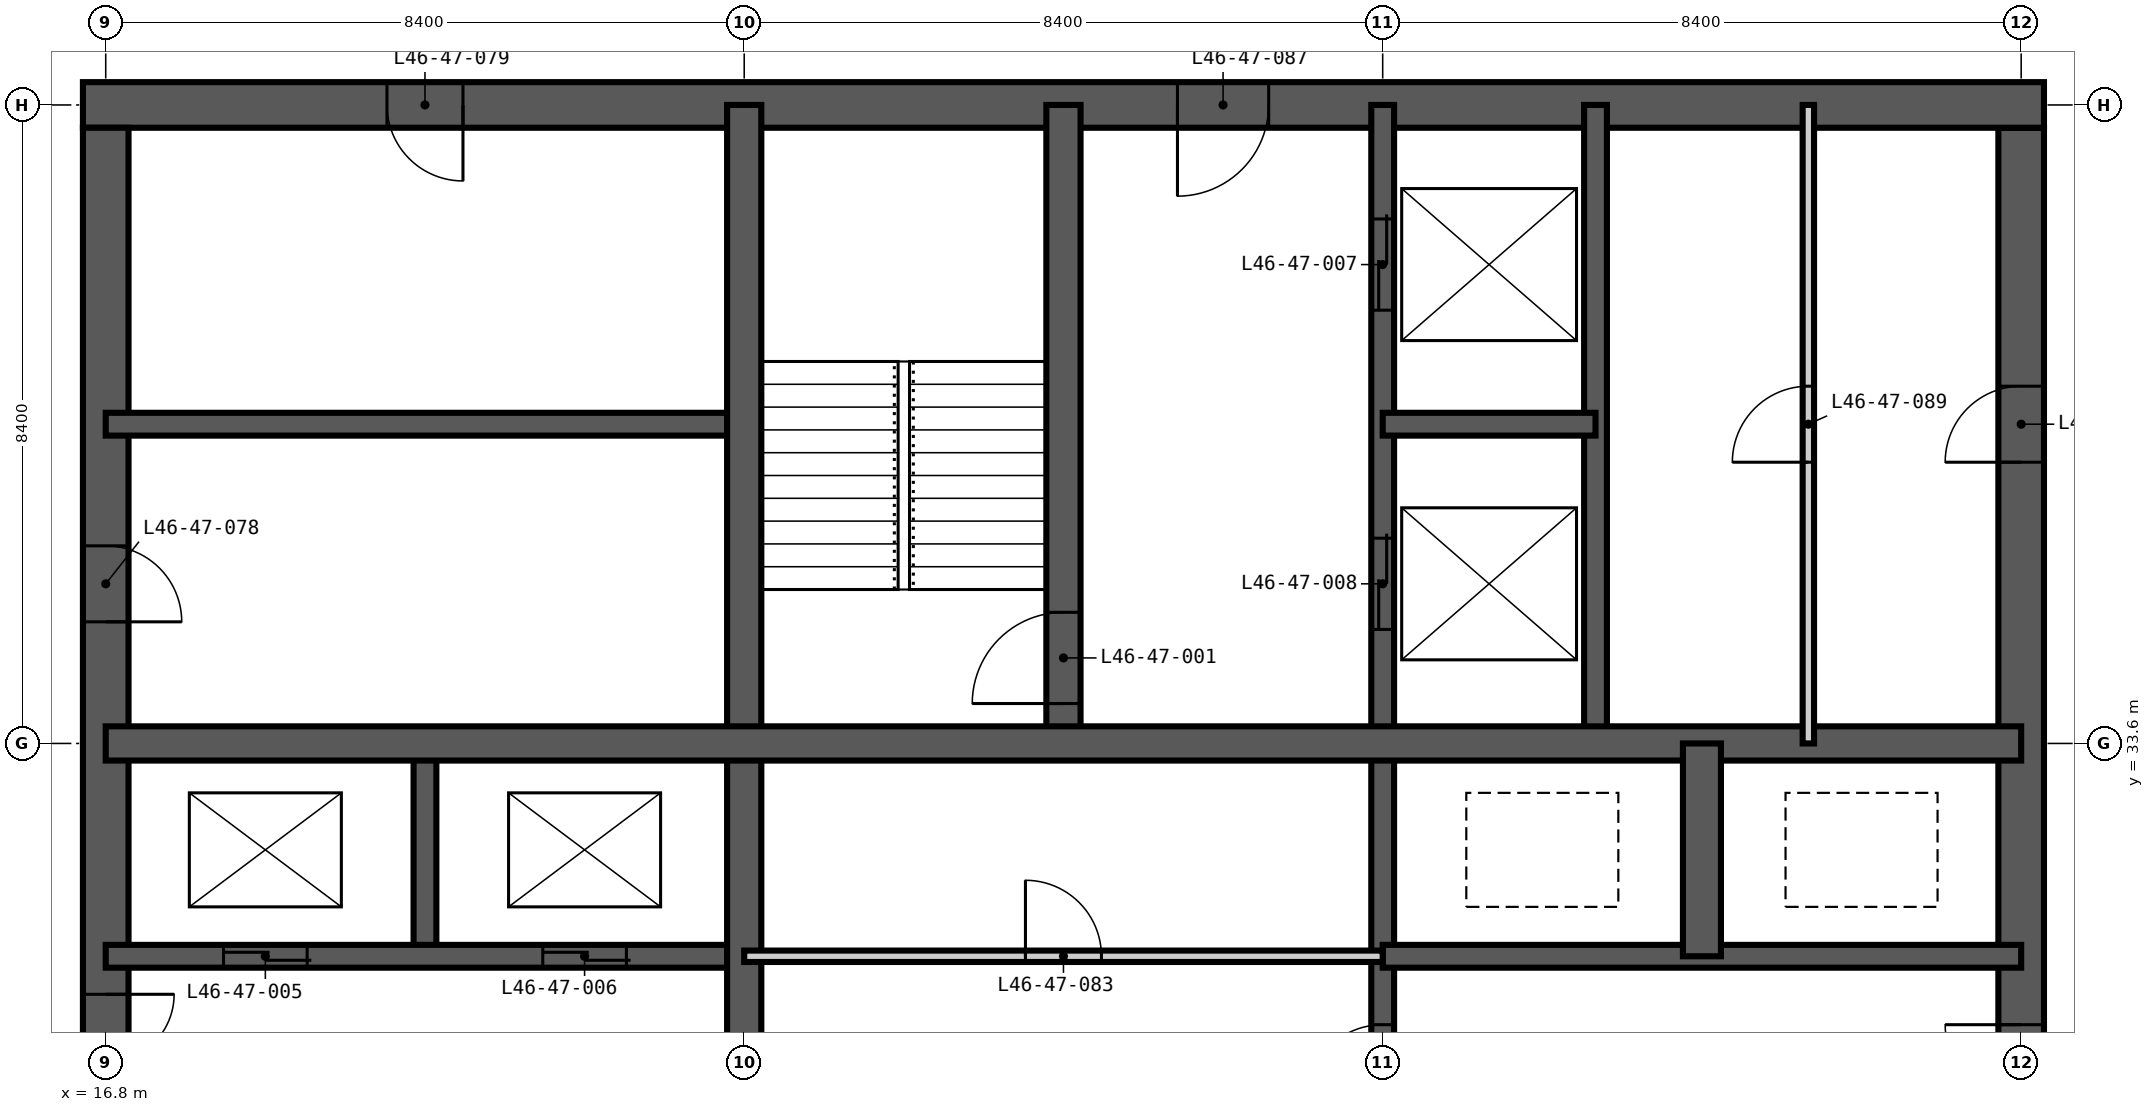
"""IFC4 building model, lengths in metres.
Left out: names, types, materials, properties, quantities, classifications, styles, units other than length and angle.
Written with IfcOpenShell. Run it as: python <this file> out.ifc"""

import sys

from ifc_helpers import new_model, si_unit, direction, frame, frame_2d, origin, place, context, subcontext, project, spatial, rectangle, extrude, element, fill, save


model = new_model("IFC4")
c1 = context("Model", 3, precision=1e-05, world=origin(), true_north=direction((0.0, 1.0)))
c2 = subcontext(c1, "Body", "Model", "MODEL_VIEW")
j1 = project(units=[si_unit("LENGTHUNIT", "METRE"), si_unit("PLANEANGLEUNIT", "RADIAN")], contexts=[c1])
p1 = place(None, origin())
s1 = spatial("IfcSite", under=j1, at=p1, CompositionType="ELEMENT")
p2 = place(p1, origin())
s2 = spatial("IfcBuilding", under=s1, at=p2, CompositionType="ELEMENT")
p3 = place(p2, frame((0.0, 0.0, 180.6)))
s3 = spatial("IfcBuildingStorey", under=s2, at=p3, CompositionType="ELEMENT", Elevation=180.6)
p4 = place(p3, frame((42.0, 17.1, -0.35), z_axis=(0.0, 0.0, 1.0), x_axis=(0.0, 1.0, 0.0)))
e1 = element("IfcWall", 1, at=p4, inside=s3, PredefinedType="SHEAR", context=c2, shape_type="SweptSolid", body=[
    extrude(rectangle(XDim=24.6, YDim=0.6, at=frame_2d((12.3, 0.0))), origin(), (0.0, 0.0, 1.0), 3.6),
])
p5 = place(p4, frame((0.5, 0.0, 0.35)))
e2 = element("IfcOpeningElement", 2, at=p5, cuts=e1, PredefinedType="OPENING", context=c2, shape_type="SweptSolid", body=[
    extrude(rectangle(XDim=1.2, YDim=2.2, at=frame_2d((0.6, 1.1))), frame((0.0, 0.31, 0.0), z_axis=(0.0, -1.0, 0.0), x_axis=(1.0, 0.0, 0.0)), (0.0, 0.0, 1.0), 0.62),
])
p6 = place(p4, frame((11.8, 0.0, 0.35)))
e3 = element("IfcOpeningElement", 3, at=p6, cuts=e1, PredefinedType="OPENING", context=c2, shape_type="SweptSolid", body=[
    extrude(rectangle(XDim=1.0, YDim=2.1, at=frame_2d((0.5, 1.05))), frame((0.0, 0.31, 0.0), z_axis=(0.0, -1.0, 0.0), x_axis=(1.0, 0.0, 0.0)), (0.0, 0.0, 1.0), 0.62),
])
p7 = place(p4, frame((20.2, 0.0, 0.35)))
e4 = element("IfcOpeningElement", 4, at=p7, cuts=e1, PredefinedType="OPENING", context=c2, shape_type="SweptSolid", body=[
    extrude(rectangle(XDim=1.0, YDim=2.1, at=frame_2d((0.5, 1.05))), frame((0.0, 0.31, 0.0), z_axis=(0.0, -1.0, 0.0), x_axis=(1.0, 0.0, 0.0)), (0.0, 0.0, 1.0), 0.62),
])
p8 = place(p3, frame((42.3, 42.0, -0.35), z_axis=(0.0, 0.0, 1.0), x_axis=(-1.0, 0.0, 0.0)))
e5 = element("IfcWall", 5, at=p8, inside=s3, PredefinedType="SHEAR", context=c2, shape_type="SweptSolid", body=[
    extrude(rectangle(XDim=25.8, YDim=0.6, at=frame_2d((12.9, 0.0))), origin(), (0.0, 0.0, 1.0), 3.6),
])
p9 = place(p8, frame((20.8, 0.0, 0.35)))
e6 = element("IfcOpeningElement", 6, at=p9, cuts=e5, PredefinedType="OPENING", context=c2, shape_type="SweptSolid", body=[
    extrude(rectangle(XDim=1.0, YDim=2.1, at=frame_2d((0.5, 1.05))), frame((0.0, 0.31, 0.0), z_axis=(0.0, -1.0, 0.0), x_axis=(1.0, 0.0, 0.0)), (0.0, 0.0, 1.0), 0.62),
])
p10 = place(p8, frame((10.2, 0.0, 0.35)))
e7 = element("IfcOpeningElement", 7, at=p10, cuts=e5, PredefinedType="OPENING", context=c2, shape_type="SweptSolid", body=[
    extrude(rectangle(XDim=1.2, YDim=2.2, at=frame_2d((0.6, 1.1))), frame((0.0, 0.31, 0.0), z_axis=(0.0, -1.0, 0.0), x_axis=(1.0, 0.0, 0.0)), (0.0, 0.0, 1.0), 0.62),
])
p11 = place(p3, frame((16.8, 41.7, -0.35), z_axis=(0.0, 0.0, 1.0), x_axis=(0.0, -1.0, 0.0)))
e8 = element("IfcWall", 8, at=p11, inside=s3, PredefinedType="SHEAR", context=c2, shape_type="SweptSolid", body=[
    extrude(rectangle(XDim=24.6, YDim=0.6, at=frame_2d((12.3, 0.0))), origin(), (0.0, 0.0, 1.0), 3.6),
])
p12 = place(p11, frame((11.4, 0.0, 0.35)))
e9 = element("IfcOpeningElement", 9, at=p12, cuts=e8, PredefinedType="OPENING", context=c2, shape_type="SweptSolid", body=[
    extrude(rectangle(XDim=1.8, YDim=2.2, at=frame_2d((0.9, 1.1))), frame((0.0, 0.31, 0.0), z_axis=(0.0, -1.0, 0.0), x_axis=(1.0, 0.0, 0.0)), (0.0, 0.0, 1.0), 0.62),
])
p13 = place(p11, frame((20.2, 0.0, 0.35)))
e10 = element("IfcOpeningElement", 10, at=p13, cuts=e8, PredefinedType="OPENING", context=c2, shape_type="SweptSolid", body=[
    extrude(rectangle(XDim=1.0, YDim=2.1, at=frame_2d((0.5, 1.05))), frame((0.0, 0.31, 0.0), z_axis=(0.0, -1.0, 0.0), x_axis=(1.0, 0.0, 0.0)), (0.0, 0.0, 1.0), 0.62),
])
p14 = place(p11, frame((5.5, 0.0, 0.35)))
e11 = element("IfcOpeningElement", 11, at=p14, cuts=e8, PredefinedType="OPENING", context=c2, shape_type="SweptSolid", body=[
    extrude(rectangle(XDim=1.0, YDim=2.1, at=frame_2d((0.5, 1.05))), frame((0.0, 0.31, 0.0), z_axis=(0.0, -1.0, 0.0), x_axis=(1.0, 0.0, 0.0)), (0.0, 0.0, 1.0), 0.62),
])
p15 = place(p3, frame((21.0, 30.8, -0.35), z_axis=(0.0, 0.0, 1.0), x_axis=(0.0, 1.0, 0.0)))
e12 = element("IfcWall", 12, at=p15, inside=s3, PredefinedType="SHEAR", context=c2, shape_type="SweptSolid", body=[
    extrude(rectangle(XDim=2.8, YDim=0.3, at=frame_2d((1.4, 0.0))), origin(), (0.0, 0.0, 1.0), 3.6),
])
p16 = place(p3, frame((33.6, 16.8, -0.35), z_axis=(0.0, 0.0, 1.0), x_axis=(0.0, 1.0, 0.0)))
e13 = element("IfcWall", 13, at=p16, inside=s3, PredefinedType="SHEAR", context=c2, shape_type="SweptSolid", body=[
    extrude(rectangle(XDim=25.2, YDim=0.3, at=frame_2d((12.6, 0.0))), origin(), (0.0, 0.0, 1.0), 3.6),
])
p17 = place(p16, frame((22.5, 0.0, 0.35)))
e14 = element("IfcOpeningElement", 14, at=p17, cuts=e13, PredefinedType="OPENING", context=c2, shape_type="SweptSolid", body=[
    extrude(rectangle(XDim=1.2, YDim=2.2, at=frame_2d((0.6, 1.1))), frame((0.0, 0.16, 0.0), z_axis=(0.0, -1.0, 0.0), x_axis=(1.0, 0.0, 0.0)), (0.0, 0.0, 1.0), 0.32),
])
p18 = place(p16, frame((18.3, 0.0, 0.35)))
e15 = element("IfcOpeningElement", 15, at=p18, cuts=e13, PredefinedType="OPENING", context=c2, shape_type="SweptSolid", body=[
    extrude(rectangle(XDim=1.2, YDim=2.2, at=frame_2d((0.6, 1.1))), frame((0.0, 0.16, 0.0), z_axis=(0.0, -1.0, 0.0), x_axis=(1.0, 0.0, 0.0)), (0.0, 0.0, 1.0), 0.32),
])
p19 = place(p16, frame((12.1, 0.0, 0.35)))
e16 = element("IfcOpeningElement", 16, at=p19, cuts=e13, PredefinedType="OPENING", context=c2, shape_type="SweptSolid", body=[
    extrude(rectangle(XDim=1.0, YDim=2.1, at=frame_2d((0.5, 1.05))), frame((0.0, 0.16, 0.0), z_axis=(0.0, -1.0, 0.0), x_axis=(1.0, 0.0, 0.0)), (0.0, 0.0, 1.0), 0.32),
])
p20 = place(p3, frame((36.4, 33.6, -0.35), z_axis=(0.0, 0.0, 1.0), x_axis=(0.0, 1.0, 0.0)))
e17 = element("IfcWall", 17, at=p20, inside=s3, PredefinedType="SHEAR", context=c2, shape_type="SweptSolid", body=[
    extrude(rectangle(XDim=8.4, YDim=0.3, at=frame_2d((4.2, 0.0))), origin(), (0.0, 0.0, 1.0), 3.6),
])
p21 = place(p3, frame((16.8, 30.8, -0.35), z_axis=(0.0, 0.0, 1.0), x_axis=(1.0, 0.0, 0.0)))
e18 = element("IfcWall", 18, at=p21, inside=s3, PredefinedType="SHEAR", context=c2, shape_type="SweptSolid", body=[
    extrude(rectangle(XDim=8.4, YDim=0.3, at=frame_2d((4.2, 0.0))), origin(), (0.0, 0.0, 1.0), 3.6),
])
p22 = place(p21, frame((1.55, 0.0, 0.35)))
e19 = element("IfcOpeningElement", 19, at=p22, cuts=e18, PredefinedType="OPENING", context=c2, shape_type="SweptSolid", body=[
    extrude(rectangle(XDim=1.1, YDim=2.2, at=frame_2d((0.55, 1.1))), frame((0.0, 0.16, 0.0), z_axis=(0.0, -1.0, 0.0), x_axis=(1.0, 0.0, 0.0)), (0.0, 0.0, 1.0), 0.32),
])
p23 = place(p21, frame((5.75, 0.0, 0.35)))
e20 = element("IfcOpeningElement", 20, at=p23, cuts=e18, PredefinedType="OPENING", context=c2, shape_type="SweptSolid", body=[
    extrude(rectangle(XDim=1.1, YDim=2.2, at=frame_2d((0.55, 1.1))), frame((0.0, 0.16, 0.0), z_axis=(0.0, -1.0, 0.0), x_axis=(1.0, 0.0, 0.0)), (0.0, 0.0, 1.0), 0.32),
])
for number, where, z_axis, x_axis in (
    (21, (33.6, 30.8, -0.35), (0.0, 0.0, 1.0), (1.0, 0.0, 0.0)),
    (22, (16.8, 37.8, -0.35), (0.0, 0.0, 1.0), (1.0, 0.0, 0.0)),
):
    element("IfcWall", number, at=place(p3, frame(where, z_axis=z_axis, x_axis=x_axis)), inside=s3, PredefinedType="SHEAR", context=c2, shape_type="SweptSolid", body=[
        extrude(rectangle(XDim=8.4, YDim=0.3, at=frame_2d((4.2, 0.0))), origin(), (0.0, 0.0, 1.0), 3.6),
    ])
p24 = place(p3, frame((33.6, 37.8, -0.35), z_axis=(0.0, 0.0, 1.0), x_axis=(1.0, 0.0, 0.0)))
e23 = element("IfcWall", 23, at=p24, inside=s3, PredefinedType="SHEAR", context=c2, shape_type="SweptSolid", body=[
    extrude(rectangle(XDim=2.8, YDim=0.3, at=frame_2d((1.4, 0.0))), origin(), (0.0, 0.0, 1.0), 3.6),
])
p25 = place(p3, frame((25.2, 16.8, -0.35), z_axis=(0.0, 0.0, 1.0), x_axis=(0.0, 1.0, 0.0)))
e24 = element("IfcWall", 24, at=p25, inside=s3, PredefinedType="SHEAR", context=c2, shape_type="SweptSolid", body=[
    extrude(rectangle(XDim=25.2, YDim=0.45, at=frame_2d((12.6, 0.0))), origin(), (0.0, 0.0, 1.0), 3.6),
])
p26 = place(p3, frame((29.4, 33.6, -0.35), z_axis=(0.0, 0.0, 1.0), x_axis=(0.0, 1.0, 0.0)))
e25 = element("IfcWall", 25, at=p26, inside=s3, PredefinedType="SHEAR", context=c2, shape_type="SweptSolid", body=[
    extrude(rectangle(XDim=8.4, YDim=0.45, at=frame_2d((4.2, 0.0))), origin(), (0.0, 0.0, 1.0), 3.6),
])
p27 = place(p26, frame((0.525, 0.0, 0.35)))
e26 = element("IfcOpeningElement", 26, at=p27, cuts=e25, PredefinedType="OPENING", context=c2, shape_type="SweptSolid", body=[
    extrude(rectangle(XDim=1.2, YDim=2.2, at=frame_2d((0.6, 1.1))), frame((0.0, 0.235, 0.0), z_axis=(0.0, -1.0, 0.0), x_axis=(1.0, 0.0, 0.0)), (0.0, 0.0, 1.0), 0.47),
])
p28 = place(p3, frame((16.8, 33.6, -0.35), z_axis=(0.0, 0.0, 1.0), x_axis=(1.0, 0.0, 0.0)))
e27 = element("IfcWall", 27, at=p28, inside=s3, PredefinedType="SHEAR", context=c2, shape_type="SweptSolid", body=[
    extrude(rectangle(XDim=25.2, YDim=0.45, at=frame_2d((12.6, 0.0))), origin(), (0.0, 0.0, 1.0), 3.6),
])
p29 = place(p3, frame((37.8, 30.8, -0.35), z_axis=(0.0, 0.0, 1.0), x_axis=(0.0, 1.0, 0.0)))
e28 = element("IfcWall", 28, at=p29, inside=s3, PredefinedType="SHEAR", context=c2, shape_type="SweptSolid", body=[
    extrude(rectangle(XDim=2.8, YDim=0.5, at=frame_2d((1.4, 0.0))), origin(), (0.0, 0.0, 1.0), 3.6),
])
p30 = place(p3, frame((39.2, 33.6, 0.0), z_axis=(0.0, 0.0, 1.0), x_axis=(0.0, 1.0, 0.0)))
e29 = element("IfcWall", 29, at=p30, inside=s3, PredefinedType="PARTITIONING", context=c2, shape_type="SweptSolid", body=[
    extrude(rectangle(XDim=8.4, YDim=0.15, at=frame_2d((4.2, 0.0))), origin(), (0.0, 0.0, 1.0), 3.25),
])
p31 = place(p30, frame((3.7, 0.0, 0.0)))
e30 = element("IfcOpeningElement", 30, at=p31, cuts=e29, PredefinedType="OPENING", context=c2, shape_type="SweptSolid", body=[
    extrude(rectangle(XDim=1.0, YDim=2.1, at=frame_2d((0.5, 1.05))), frame((0.0, 0.085, 0.0), z_axis=(0.0, -1.0, 0.0), x_axis=(1.0, 0.0, 0.0)), (0.0, 0.0, 1.0), 0.17),
])
p32 = place(p3, frame((25.2, 30.8, 0.0), z_axis=(0.0, 0.0, 1.0), x_axis=(1.0, 0.0, 0.0)))
e31 = element("IfcWall", 31, at=p32, inside=s3, PredefinedType="PARTITIONING", context=c2, shape_type="SweptSolid", body=[
    extrude(rectangle(XDim=8.4, YDim=0.15, at=frame_2d((4.2, 0.0))), origin(), (0.0, 0.0, 1.0), 3.25),
])
p33 = place(p32, frame((3.7, 0.0, 0.0)))
e32 = element("IfcOpeningElement", 32, at=p33, cuts=e31, PredefinedType="OPENING", context=c2, shape_type="SweptSolid", body=[
    extrude(rectangle(XDim=1.0, YDim=2.1, at=frame_2d((0.5, 1.05))), frame((0.0, 0.085, 0.0), z_axis=(0.0, -1.0, 0.0), x_axis=(1.0, 0.0, 0.0)), (0.0, 0.0, 1.0), 0.17),
])
p34 = place(p27, origin())
e33 = element("IfcDoor", 33, at=p34, inside=s3, OperationType="SINGLE_SWING_LEFT", PredefinedType="DOOR", context=c2, shape_type="SweptSolid", body=[
    extrude(rectangle(XDim=1.2, YDim=2.2, at=frame_2d((0.6, 1.1))), frame((0.0, 0.025, 0.0), z_axis=(0.0, -1.0, 0.0), x_axis=(1.0, 0.0, 0.0)), (0.0, 0.0, 1.0), 0.05),
])
fill(e26, e33)
p35 = place(p22, origin())
e34 = element("IfcDoor", 34, at=p35, inside=s3, OperationType="DOUBLE_DOOR_SLIDING", PredefinedType="DOOR", context=c2, shape_type="SweptSolid", body=[
    extrude(rectangle(XDim=1.1, YDim=2.2, at=frame_2d((0.55, 1.1))), frame((0.0, 0.025, 0.0), z_axis=(0.0, -1.0, 0.0), x_axis=(1.0, 0.0, 0.0)), (0.0, 0.0, 1.0), 0.05),
])
fill(e19, e34)
p36 = place(p23, origin())
e35 = element("IfcDoor", 35, at=p36, inside=s3, OperationType="DOUBLE_DOOR_SLIDING", PredefinedType="DOOR", context=c2, shape_type="SweptSolid", body=[
    extrude(rectangle(XDim=1.1, YDim=2.2, at=frame_2d((0.55, 1.1))), frame((0.0, 0.025, 0.0), z_axis=(0.0, -1.0, 0.0), x_axis=(1.0, 0.0, 0.0)), (0.0, 0.0, 1.0), 0.05),
])
fill(e20, e35)
p37 = place(p17, origin())
e36 = element("IfcDoor", 36, at=p37, inside=s3, OperationType="DOUBLE_DOOR_SLIDING", PredefinedType="DOOR", context=c2, shape_type="SweptSolid", body=[
    extrude(rectangle(XDim=1.2, YDim=2.2, at=frame_2d((0.6, 1.1))), frame((0.0, 0.025, 0.0), z_axis=(0.0, -1.0, 0.0), x_axis=(1.0, 0.0, 0.0)), (0.0, 0.0, 1.0), 0.05),
])
fill(e14, e36)
p38 = place(p18, origin())
e37 = element("IfcDoor", 37, at=p38, inside=s3, OperationType="DOUBLE_DOOR_SLIDING", PredefinedType="DOOR", context=c2, shape_type="SweptSolid", body=[
    extrude(rectangle(XDim=1.2, YDim=2.2, at=frame_2d((0.6, 1.1))), frame((0.0, 0.025, 0.0), z_axis=(0.0, -1.0, 0.0), x_axis=(1.0, 0.0, 0.0)), (0.0, 0.0, 1.0), 0.05),
])
fill(e15, e37)
p39 = place(p12, origin())
e38 = element("IfcDoor", 38, at=p39, inside=s3, OperationType="DOUBLE_DOOR_DOUBLE_SWING", PredefinedType="DOOR", context=c2, shape_type="SweptSolid", body=[
    extrude(rectangle(XDim=1.8, YDim=2.2, at=frame_2d((0.9, 1.1))), frame((0.0, 0.025, 0.0), z_axis=(0.0, -1.0, 0.0), x_axis=(1.0, 0.0, 0.0)), (0.0, 0.0, 1.0), 0.05),
])
fill(e9, e38)
p40 = place(p14, origin())
e39 = element("IfcDoor", 39, at=p40, inside=s3, OperationType="SINGLE_SWING_RIGHT", PredefinedType="DOOR", context=c2, shape_type="SweptSolid", body=[
    extrude(rectangle(XDim=1.0, YDim=2.1, at=frame_2d((0.5, 1.05))), frame((0.0, 0.025, 0.0), z_axis=(0.0, -1.0, 0.0), x_axis=(1.0, 0.0, 0.0)), (0.0, 0.0, 1.0), 0.05),
])
fill(e11, e39)
p41 = place(p9, origin())
e40 = element("IfcDoor", 40, at=p41, inside=s3, OperationType="SINGLE_SWING_LEFT", PredefinedType="DOOR", context=c2, shape_type="SweptSolid", body=[
    extrude(rectangle(XDim=1.0, YDim=2.1, at=frame_2d((0.5, 1.05))), frame((0.0, 0.025, 0.0), z_axis=(0.0, -1.0, 0.0), x_axis=(1.0, 0.0, 0.0)), (0.0, 0.0, 1.0), 0.05),
])
fill(e6, e40)
p42 = place(p19, origin())
e41 = element("IfcDoor", 41, at=p42, inside=s3, OperationType="SINGLE_SWING_LEFT", PredefinedType="DOOR", context=c2, shape_type="SweptSolid", body=[
    extrude(rectangle(XDim=1.0, YDim=2.1, at=frame_2d((0.5, 1.05))), frame((0.0, 0.025, 0.0), z_axis=(0.0, -1.0, 0.0), x_axis=(1.0, 0.0, 0.0)), (0.0, 0.0, 1.0), 0.05),
])
fill(e16, e41)
p43 = place(p33, origin())
e42 = element("IfcDoor", 42, at=p43, inside=s3, OperationType="SINGLE_SWING_LEFT", PredefinedType="DOOR", context=c2, shape_type="SweptSolid", body=[
    extrude(rectangle(XDim=1.0, YDim=2.1, at=frame_2d((0.5, 1.05))), frame((0.0, 0.025, 0.0), z_axis=(0.0, -1.0, 0.0), x_axis=(1.0, 0.0, 0.0)), (0.0, 0.0, 1.0), 0.05),
])
fill(e32, e42)
p44 = place(p6, origin())
e43 = element("IfcDoor", 43, at=p44, inside=s3, OperationType="SINGLE_SWING_RIGHT", PredefinedType="DOOR", context=c2, shape_type="SweptSolid", body=[
    extrude(rectangle(XDim=1.0, YDim=2.1, at=frame_2d((0.5, 1.05))), frame((0.0, 0.025, 0.0), z_axis=(0.0, -1.0, 0.0), x_axis=(1.0, 0.0, 0.0)), (0.0, 0.0, 1.0), 0.05),
])
fill(e3, e43)
p45 = place(p10, origin())
e44 = element("IfcDoor", 44, at=p45, inside=s3, OperationType="SINGLE_SWING_RIGHT", PredefinedType="DOOR", context=c2, shape_type="SweptSolid", body=[
    extrude(rectangle(XDim=1.2, YDim=2.2, at=frame_2d((0.6, 1.1))), frame((0.0, 0.025, 0.0), z_axis=(0.0, -1.0, 0.0), x_axis=(1.0, 0.0, 0.0)), (0.0, 0.0, 1.0), 0.05),
])
fill(e7, e44)
p46 = place(p7, origin())
e45 = element("IfcDoor", 45, at=p46, inside=s3, OperationType="SINGLE_SWING_LEFT", PredefinedType="DOOR", context=c2, shape_type="SweptSolid", body=[
    extrude(rectangle(XDim=1.0, YDim=2.1, at=frame_2d((0.5, 1.05))), frame((0.0, 0.025, 0.0), z_axis=(0.0, -1.0, 0.0), x_axis=(1.0, 0.0, 0.0)), (0.0, 0.0, 1.0), 0.05),
])
fill(e4, e45)
p47 = place(p31, origin())
e46 = element("IfcDoor", 46, at=p47, inside=s3, OperationType="SINGLE_SWING_LEFT", PredefinedType="DOOR", context=c2, shape_type="SweptSolid", body=[
    extrude(rectangle(XDim=1.0, YDim=2.1, at=frame_2d((0.5, 1.05))), frame((0.0, 0.025, 0.0), z_axis=(0.0, -1.0, 0.0), x_axis=(1.0, 0.0, 0.0)), (0.0, 0.0, 1.0), 0.05),
])
fill(e30, e46)
save(model, sys.argv[1])
